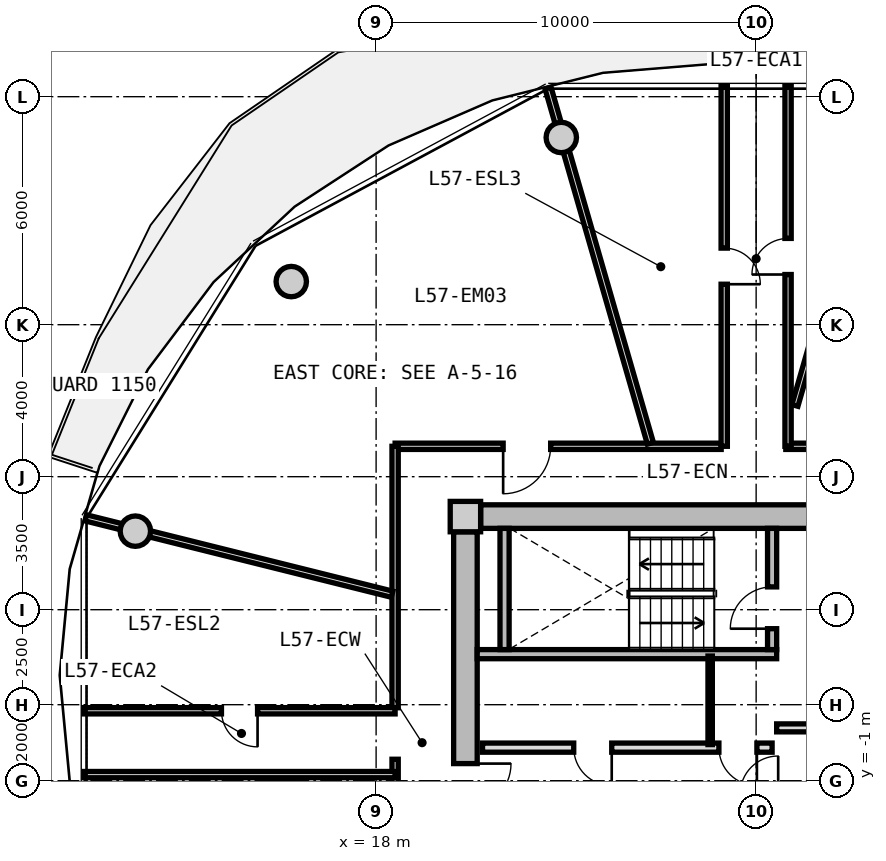
"""IFC4 building model, lengths in metres.
Left out: names, types, materials, properties, quantities, classifications, styles, units other than length and angle.
Written with IfcOpenShell. Run it as: python <this file> out.ifc"""

import sys

from ifc_helpers import new_model, si_unit, direction, frame, frame_2d, origin, origin_2d, place, context, subcontext, project, spatial, rectangle, circle, extrude, source, transform, mapped, element, fill, save


model = new_model("IFC4")
c1 = context("Model", 3, precision=1e-05, world=origin(), true_north=direction((0.0, 1.0)))
c2 = subcontext(c1, "Body", "Model", "MODEL_VIEW")
j1 = project(units=[si_unit("LENGTHUNIT", "METRE"), si_unit("PLANEANGLEUNIT", "RADIAN")], contexts=[c1])
p1 = place(None, origin())
s1 = spatial("IfcSite", under=j1, at=p1, CompositionType="ELEMENT")
p2 = place(p1, origin())
s2 = spatial("IfcBuilding", under=s1, at=p2, CompositionType="ELEMENT")
p3 = place(p2, frame((0.0, 0.0, 183.1)))
s3 = spatial("IfcBuildingStorey", under=s2, at=p3, CompositionType="ELEMENT", Elevation=183.1)
m1 = source(origin(), c2, "Body", "SweptSolid", [
    extrude(rectangle(XDim=0.8, YDim=0.8, at=origin_2d()), origin(), (0.0, 0.0, 1.0), 3.05),
])
p4 = place(p3, frame((20.35, 5.95, 0.0), z_axis=(0.0, 0.0, 1.0), x_axis=(1.0, 0.0, 0.0)))
e1 = element("IfcColumn", 1, at=p4, inside=s3, PredefinedType="COLUMN", context=c2, shape_type="MappedRepresentation", body=[
    mapped(m1, transform((0.0, 0.0, 0.0), x_axis=(1.0, 0.0, 0.0), y_axis=(0.0, 1.0, 0.0), z_axis=(0.0, 0.0, 1.0), scale=1.0)),
])
m2 = source(origin(), c2, "Body", "SweptSolid", [
    extrude(rectangle(XDim=14.5, YDim=0.62, at=frame_2d((7.25, 0.0))), origin(), (0.0, 0.0, 1.0), 2.73),
])
p5 = place(p3, frame((20.75, 5.95, 0.0), z_axis=(0.0, 0.0, 1.0), x_axis=(1.0, 0.0, 0.0)))
e2 = element("IfcWall", 2, at=p5, inside=s3, PredefinedType="SHEAR", context=c2, shape_type="MappedRepresentation", body=[
    mapped(m2, transform((0.0, 0.0, 0.0), x_axis=(1.0, 0.0, 0.0), y_axis=(0.0, 1.0, 0.0), z_axis=(0.0, 0.0, 1.0), scale=1.0)),
])
m3 = source(origin(), c2, "Body", "SweptSolid", [
    extrude(rectangle(XDim=11.1, YDim=0.62, at=frame_2d((5.55, 0.0))), origin(), (0.0, 0.0, 1.0), 2.73),
])
p6 = place(p3, frame((20.35, -5.55, 0.0), z_axis=(0.0, 0.0, 1.0), x_axis=(0.0, 1.0, 0.0)))
e3 = element("IfcWall", 3, at=p6, inside=s3, PredefinedType="SHEAR", context=c2, shape_type="MappedRepresentation", body=[
    mapped(m3, transform((0.0, 0.0, 0.0), x_axis=(1.0, 0.0, 0.0), y_axis=(0.0, 1.0, 0.0), z_axis=(0.0, 0.0, 1.0), scale=1.0)),
])
p7 = place(p6, frame((3.8, 0.0, 0.0)))
e4 = element("IfcOpeningElement", 4, at=p7, cuts=e3, PredefinedType="OPENING", context=c2, shape_type="SweptSolid", body=[
    extrude(rectangle(XDim=1.2, YDim=2.15, at=frame_2d((0.6, 1.075))), frame((0.0, 0.32, 0.0), z_axis=(0.0, -1.0, 0.0), x_axis=(1.0, 0.0, 0.0)), (0.0, 0.0, 1.0), 0.64),
])
m4 = source(origin(), c2, "Body", "SweptSolid", [
    extrude(circle(Radius=0.4, at=origin_2d()), origin(), (0.0, 0.0, 1.0), 3.05),
])
for number, where, z_axis, x_axis in (
    (5, (22.873, 15.926, 0.0), (0.0, 0.0, 1.0), (1.0, 0.0, 0.0)),
    (6, (15.767, 12.135, 0.0), (0.0, 0.0, 1.0), (1.0, 0.0, 0.0)),
    (7, (11.665, 5.567, 0.0), (0.0, 0.0, 1.0), (1.0, 0.0, 0.0)),
):
    element("IfcColumn", number, at=place(p3, frame(where, z_axis=z_axis, x_axis=x_axis)), inside=s3, PredefinedType="COLUMN", context=c2, shape_type="MappedRepresentation", body=[
        mapped(m4, transform((0.0, 0.0, 0.0), x_axis=(1.0, 0.0, 0.0), y_axis=(0.0, 1.0, 0.0), z_axis=(0.0, 0.0, 1.0), scale=1.0)),
    ])
m5 = source(origin(), c2, "Body", "SweptSolid", [
    extrude(rectangle(XDim=7.88, YDim=0.24, at=frame_2d((3.94, 0.0))), origin(), (0.0, 0.0, 1.0), 2.73),
])
p8 = place(p3, frame((20.66, 2.33, 0.0), z_axis=(0.0, 0.0, 1.0), x_axis=(1.0, 0.0, 0.0)))
e8 = element("IfcWall", 8, at=p8, inside=s3, PredefinedType="PARTITIONING", context=c2, shape_type="MappedRepresentation", body=[
    mapped(m5, transform((0.0, 0.0, 0.0), x_axis=(1.0, 0.0, 0.0), y_axis=(0.0, 1.0, 0.0), z_axis=(0.0, 0.0, 1.0), scale=1.0)),
])
m6 = source(origin(), c2, "Body", "SweptSolid", [
    extrude(rectangle(XDim=3.19, YDim=0.24, at=frame_2d((1.595, 0.0))), origin(), (0.0, 0.0, 1.0), 2.73),
])
p9 = place(p3, frame((21.38, 2.45, 0.0), z_axis=(0.0, 0.0, 1.0), x_axis=(0.0, 1.0, 0.0)))
e9 = element("IfcWall", 9, at=p9, inside=s3, PredefinedType="PARTITIONING", context=c2, shape_type="MappedRepresentation", body=[
    mapped(m6, transform((0.0, 0.0, 0.0), x_axis=(1.0, 0.0, 0.0), y_axis=(0.0, 1.0, 0.0), z_axis=(0.0, 0.0, 1.0), scale=1.0)),
])
p10 = place(p3, frame((28.42, 2.45, 0.0), z_axis=(0.0, 0.0, 1.0), x_axis=(0.0, 1.0, 0.0)))
e10 = element("IfcWall", 10, at=p10, inside=s3, PredefinedType="PARTITIONING", context=c2, shape_type="MappedRepresentation", body=[
    mapped(m6, transform((0.0, 0.0, 0.0), x_axis=(1.0, 0.0, 0.0), y_axis=(0.0, 1.0, 0.0), z_axis=(0.0, 0.0, 1.0), scale=1.0)),
])
p11 = place(p10, frame((0.55, 0.0, 0.0)))
e11 = element("IfcOpeningElement", 11, at=p11, cuts=e10, PredefinedType="OPENING", context=c2, shape_type="SweptSolid", body=[
    extrude(rectangle(XDim=1.1, YDim=2.15, at=frame_2d((0.55, 1.075))), frame((0.0, 0.13, 0.0), z_axis=(0.0, -1.0, 0.0), x_axis=(1.0, 0.0, 0.0)), (0.0, 0.0, 1.0), 0.26),
])
m7 = source(origin(), c2, "Body", "SweptSolid", [
    extrude(rectangle(XDim=6.66, YDim=0.21, at=frame_2d((3.33, 0.0))), origin(), (0.0, 0.0, 1.0), 2.715),
])
p12 = place(p3, frame((28.54, 0.39, 0.0), z_axis=(0.0, 0.0, 1.0), x_axis=(1.0, 0.0, 0.0)))
e12 = element("IfcWall", 12, at=p12, inside=s3, PredefinedType="PARTITIONING", context=c2, shape_type="MappedRepresentation", body=[
    mapped(m7, transform((0.0, 0.0, 0.0), x_axis=(1.0, 0.0, 0.0), y_axis=(0.0, 1.0, 0.0), z_axis=(0.0, 0.0, 1.0), scale=1.0)),
])
p13 = place(p12, frame((1.0, 0.0, 0.0)))
e13 = element("IfcOpeningElement", 13, at=p13, cuts=e12, PredefinedType="OPENING", context=c2, shape_type="SweptSolid", body=[
    extrude(rectangle(XDim=1.2, YDim=2.15, at=frame_2d((0.6, 1.075))), frame((0.0, 0.115, 0.0), z_axis=(0.0, -1.0, 0.0), x_axis=(1.0, 0.0, 0.0)), (0.0, 0.0, 1.0), 0.23),
])
m8 = source(origin(), c2, "Body", "SweptSolid", [
    extrude(rectangle(XDim=7.62, YDim=0.24, at=frame_2d((3.81, 0.0))), origin(), (0.0, 0.0, 1.0), 2.715),
])
p14 = place(p3, frame((20.8, -0.13, 0.0), z_axis=(0.0, 0.0, 1.0), x_axis=(1.0, 0.0, 0.0)))
e14 = element("IfcWall", 14, at=p14, inside=s3, PredefinedType="PARTITIONING", context=c2, shape_type="MappedRepresentation", body=[
    mapped(m8, transform((0.0, 0.0, 0.0), x_axis=(1.0, 0.0, 0.0), y_axis=(0.0, 1.0, 0.0), z_axis=(0.0, 0.0, 1.0), scale=1.0)),
])
p15 = place(p14, frame((6.22, 0.0, 0.0)))
e15 = element("IfcOpeningElement", 15, at=p15, cuts=e14, PredefinedType="OPENING", context=c2, shape_type="SweptSolid", body=[
    extrude(rectangle(XDim=1.0, YDim=2.1, at=frame_2d((0.5, 1.05))), frame((0.0, 0.13, 0.0), z_axis=(0.0, -1.0, 0.0), x_axis=(1.0, 0.0, 0.0)), (0.0, 0.0, 1.0), 0.26),
])
p16 = place(p14, frame((2.4, 0.0, 0.0)))
e16 = element("IfcOpeningElement", 16, at=p16, cuts=e14, PredefinedType="OPENING", context=c2, shape_type="SweptSolid", body=[
    extrude(rectangle(XDim=1.0, YDim=2.1, at=frame_2d((0.5, 1.05))), frame((0.0, 0.13, 0.0), z_axis=(0.0, -1.0, 0.0), x_axis=(1.0, 0.0, 0.0)), (0.0, 0.0, 1.0), 0.26),
])
m9 = source(origin(), c2, "Body", "SweptSolid", [
    extrude(rectangle(XDim=2.33, YDim=0.115, at=frame_2d((1.165, 0.0))), origin(), (0.0, 0.0, 1.0), 2.715),
])
p17 = place(p3, frame((26.79, -0.05, 0.0), z_axis=(0.0, 0.0, 1.0), x_axis=(0.0, 1.0, 0.0)))
e17 = element("IfcWall", 17, at=p17, inside=s3, PredefinedType="PARTITIONING", context=c2, shape_type="MappedRepresentation", body=[
    mapped(m9, transform((0.0, 0.0, 0.0), x_axis=(1.0, 0.0, 0.0), y_axis=(0.0, 1.0, 0.0), z_axis=(0.0, 0.0, 1.0), scale=1.0)),
])
m10 = source(origin(), c2, "Body", "SweptSolid", [
    extrude(rectangle(XDim=8.58, YDim=0.165, at=frame_2d((4.29, 0.0))), origin(), (0.0, 0.0, 1.0), 2.715),
])
p18 = place(p3, frame((18.5, 7.8, 0.0), z_axis=(0.0, 0.0, 1.0), x_axis=(1.0, 0.0, 0.0)))
e18 = element("IfcWall", 18, at=p18, inside=s3, PredefinedType="PARTITIONING", context=c2, shape_type="MappedRepresentation", body=[
    mapped(m10, transform((0.0, 0.0, 0.0), x_axis=(1.0, 0.0, 0.0), y_axis=(0.0, 1.0, 0.0), z_axis=(0.0, 0.0, 1.0), scale=1.0)),
])
p19 = place(p18, frame((2.843, 0.0, 0.0)))
e19 = element("IfcOpeningElement", 19, at=p19, cuts=e18, PredefinedType="OPENING", context=c2, shape_type="SweptSolid", body=[
    extrude(rectangle(XDim=1.25, YDim=2.2, at=frame_2d((0.625, 1.1))), frame((0.0, 0.093, 0.0), z_axis=(0.0, -1.0, 0.0), x_axis=(1.0, 0.0, 0.0)), (0.0, 0.0, 1.0), 0.185),
])
m11 = source(origin(), c2, "Body", "SweptSolid", [
    extrude(rectangle(XDim=8.719, YDim=0.165, at=frame_2d((4.36, 0.0))), origin(), (0.0, 0.0, 1.0), 2.715),
])
p20 = place(p3, frame((28.781, 7.8, 0.0), z_axis=(0.0, 0.0, 1.0), x_axis=(1.0, 0.0, 0.0)))
e20 = element("IfcWall", 20, at=p20, inside=s3, PredefinedType="PARTITIONING", context=c2, shape_type="MappedRepresentation", body=[
    mapped(m11, transform((0.0, 0.0, 0.0), x_axis=(1.0, 0.0, 0.0), y_axis=(0.0, 1.0, 0.0), z_axis=(0.0, 0.0, 1.0), scale=1.0)),
])
p21 = place(p20, frame((6.054, 0.0, 0.0)))
e21 = element("IfcOpeningElement", 21, at=p21, cuts=e20, PredefinedType="OPENING", context=c2, shape_type="SweptSolid", body=[
    extrude(rectangle(XDim=1.05, YDim=2.15, at=frame_2d((0.525, 1.075))), frame((0.0, 0.093, 0.0), z_axis=(0.0, -1.0, 0.0), x_axis=(1.0, 0.0, 0.0)), (0.0, 0.0, 1.0), 0.185),
])
p22 = place(p20, frame((3.287, 0.0, 0.0)))
e22 = element("IfcOpeningElement", 22, at=p22, cuts=e20, PredefinedType="OPENING", context=c2, shape_type="SweptSolid", body=[
    extrude(rectangle(XDim=0.92, YDim=2.1, at=frame_2d((0.46, 1.05))), frame((0.0, 0.093, 0.0), z_axis=(0.0, -1.0, 0.0), x_axis=(1.0, 0.0, 0.0)), (0.0, 0.0, 1.0), 0.185),
])
p23 = place(p20, frame((1.0, 0.0, 0.0)))
e23 = element("IfcOpeningElement", 23, at=p23, cuts=e20, PredefinedType="OPENING", context=c2, shape_type="SweptSolid", body=[
    extrude(rectangle(XDim=0.92, YDim=2.1, at=frame_2d((0.46, 1.05))), frame((0.0, 0.093, 0.0), z_axis=(0.0, -1.0, 0.0), x_axis=(1.0, 0.0, 0.0)), (0.0, 0.0, 1.0), 0.185),
])
m12 = source(origin(), c2, "Body", "SweptSolid", [
    extrude(rectangle(XDim=7.365, YDim=0.165, at=frame_2d((3.682, 0.0))), origin(), (0.0, 0.0, 1.0), 2.715),
])
p24 = place(p3, frame((18.5, -7.8, 0.0), z_axis=(0.0, 0.0, 1.0), x_axis=(0.0, 1.0, 0.0)))
e24 = element("IfcWall", 24, at=p24, inside=s3, PredefinedType="PARTITIONING", context=c2, shape_type="MappedRepresentation", body=[
    mapped(m12, transform((0.0, 0.0, 0.0), x_axis=(1.0, 0.0, 0.0), y_axis=(0.0, 1.0, 0.0), z_axis=(0.0, 0.0, 1.0), scale=1.0)),
])
m13 = source(origin(), c2, "Body", "SweptSolid", [
    extrude(rectangle(XDim=6.88, YDim=0.165, at=frame_2d((3.44, 0.0))), origin(), (0.0, 0.0, 1.0), 2.715),
])
p25 = place(p3, frame((18.5, 0.92, 0.0), z_axis=(0.0, 0.0, 1.0), x_axis=(0.0, 1.0, 0.0)))
e25 = element("IfcWall", 25, at=p25, inside=s3, PredefinedType="PARTITIONING", context=c2, shape_type="MappedRepresentation", body=[
    mapped(m13, transform((0.0, 0.0, 0.0), x_axis=(1.0, 0.0, 0.0), y_axis=(0.0, 1.0, 0.0), z_axis=(0.0, 0.0, 1.0), scale=1.0)),
])
m14 = source(origin(), c2, "Body", "SweptSolid", [
    extrude(rectangle(XDim=8.695, YDim=0.165, at=frame_2d((4.348, 0.0))), origin(), (0.0, 0.0, 1.0), 2.265),
])
p26 = place(p3, frame((29.02, 8.875, 0.0), z_axis=(0.0, 0.0, 1.0), x_axis=(0.276797231892, 0.960928349263, 0.0)))
e26 = element("IfcWall", 26, at=p26, inside=s3, PredefinedType="PARTITIONING", context=c2, shape_type="MappedRepresentation", body=[
    mapped(m14, transform((0.0, 0.0, 0.0), x_axis=(1.0, 0.0, 0.0), y_axis=(0.0, 1.0, 0.0), z_axis=(0.0, 0.0, 1.0), scale=1.0)),
])
m15 = source(origin(), c2, "Body", "SweptSolid", [
    extrude(rectangle(XDim=9.73, YDim=0.165, at=frame_2d((4.865, 0.0))), origin(), (0.0, 0.0, 1.0), 2.265),
])
p27 = place(p3, frame((25.217, 7.88, 0.0), z_axis=(0.0, 0.0, 1.0), x_axis=(-0.27679492614, 0.960929013436, 0.0)))
e27 = element("IfcWall", 27, at=p27, inside=s3, PredefinedType="PARTITIONING", context=c2, shape_type="MappedRepresentation", body=[
    mapped(m15, transform((0.0, 0.0, 0.0), x_axis=(1.0, 0.0, 0.0), y_axis=(0.0, 1.0, 0.0), z_axis=(0.0, 0.0, 1.0), scale=1.0)),
])
m16 = source(origin(), c2, "Body", "SweptSolid", [
    extrude(rectangle(XDim=8.305, YDim=0.165, at=frame_2d((4.153, 0.0))), origin(), (0.0, 0.0, 1.0), 2.265),
])
p28 = place(p3, frame((18.42, 3.908, 0.0), z_axis=(0.0, 0.0, 1.0), x_axis=(-0.970309994378, 0.241864662175, 0.0)))
e28 = element("IfcWall", 28, at=p28, inside=s3, PredefinedType="PARTITIONING", context=c2, shape_type="MappedRepresentation", body=[
    mapped(m16, transform((0.0, 0.0, 0.0), x_axis=(1.0, 0.0, 0.0), y_axis=(0.0, 1.0, 0.0), z_axis=(0.0, 0.0, 1.0), scale=1.0)),
])
m17 = source(origin(), c2, "Body", "SweptSolid", [
    extrude(rectangle(XDim=5.564, YDim=0.165, at=frame_2d((2.782, 0.0))), origin(), (0.0, 0.0, 1.0), 2.265),
])
p29 = place(p3, frame((15.76, -1.02, 0.0), z_axis=(0.0, 0.0, 1.0), x_axis=(-0.970315176167, -0.241843872984, 0.0)))
e29 = element("IfcWall", 29, at=p29, inside=s3, PredefinedType="PARTITIONING", context=c2, shape_type="MappedRepresentation", body=[
    mapped(m17, transform((0.0, 0.0, 0.0), x_axis=(1.0, 0.0, 0.0), y_axis=(0.0, 1.0, 0.0), z_axis=(0.0, 0.0, 1.0), scale=1.0)),
])
m18 = source(origin(), c2, "Body", "SweptSolid", [
    extrude(rectangle(XDim=9.48, YDim=0.165, at=frame_2d((4.74, 0.0))), origin(), (0.0, 0.0, 1.0), 2.715),
])
p30 = place(p3, frame((27.16, 7.8, 0.0), z_axis=(0.0, 0.0, 1.0), x_axis=(0.0, 1.0, 0.0)))
e30 = element("IfcWall", 30, at=p30, inside=s3, PredefinedType="PARTITIONING", context=c2, shape_type="MappedRepresentation", body=[
    mapped(m18, transform((0.0, 0.0, 0.0), x_axis=(1.0, 0.0, 0.0), y_axis=(0.0, 1.0, 0.0), z_axis=(0.0, 0.0, 1.0), scale=1.0)),
])
p31 = place(p30, frame((4.265, 0.0, 0.0)))
e31 = element("IfcOpeningElement", 31, at=p31, cuts=e30, PredefinedType="OPENING", context=c2, shape_type="SweptSolid", body=[
    extrude(rectangle(XDim=0.95, YDim=2.1, at=frame_2d((0.475, 1.05))), frame((0.0, 0.093, 0.0), z_axis=(0.0, -1.0, 0.0), x_axis=(1.0, 0.0, 0.0)), (0.0, 0.0, 1.0), 0.185),
])
p32 = place(p3, frame((28.84, 17.28, 0.0), z_axis=(0.0, 0.0, 1.0), x_axis=(0.0, -1.0, 0.0)))
e32 = element("IfcWall", 32, at=p32, inside=s3, PredefinedType="PARTITIONING", context=c2, shape_type="MappedRepresentation", body=[
    mapped(m18, transform((0.0, 0.0, 0.0), x_axis=(1.0, 0.0, 0.0), y_axis=(0.0, 1.0, 0.0), z_axis=(0.0, 0.0, 1.0), scale=1.0)),
])
p33 = place(p32, frame((4.01, 0.0, 0.0)))
e33 = element("IfcOpeningElement", 33, at=p33, cuts=e32, PredefinedType="OPENING", context=c2, shape_type="SweptSolid", body=[
    extrude(rectangle(XDim=0.95, YDim=2.1, at=frame_2d((0.475, 1.05))), frame((0.0, 0.093, 0.0), z_axis=(0.0, -1.0, 0.0), x_axis=(1.0, 0.0, 0.0)), (0.0, 0.0, 1.0), 0.185),
])
m19 = source(origin(), c2, "Body", "SweptSolid", [
    extrude(rectangle(XDim=8.189, YDim=0.165, at=frame_2d((4.094, 0.0))), origin(), (0.0, 0.0, 1.0), 2.715),
])
p34 = place(p3, frame((10.311, 0.84, 0.0), z_axis=(0.0, 0.0, 1.0), x_axis=(1.0, 0.0, 0.0)))
e34 = element("IfcWall", 34, at=p34, inside=s3, PredefinedType="PARTITIONING", context=c2, shape_type="MappedRepresentation", body=[
    mapped(m19, transform((0.0, 0.0, 0.0), x_axis=(1.0, 0.0, 0.0), y_axis=(0.0, 1.0, 0.0), z_axis=(0.0, 0.0, 1.0), scale=1.0)),
])
p35 = place(p34, frame((3.619, 0.0, 0.0)))
e35 = element("IfcOpeningElement", 35, at=p35, cuts=e34, PredefinedType="OPENING", context=c2, shape_type="SweptSolid", body=[
    extrude(rectangle(XDim=0.95, YDim=2.1, at=frame_2d((0.475, 1.05))), frame((0.0, 0.093, 0.0), z_axis=(0.0, -1.0, 0.0), x_axis=(1.0, 0.0, 0.0)), (0.0, 0.0, 1.0), 0.185),
])
p36 = place(p3, frame((18.5, -0.84, 0.0), z_axis=(0.0, 0.0, 1.0), x_axis=(-1.0, 0.0, 0.0)))
e36 = element("IfcWall", 36, at=p36, inside=s3, PredefinedType="PARTITIONING", context=c2, shape_type="MappedRepresentation", body=[
    mapped(m19, transform((0.0, 0.0, 0.0), x_axis=(1.0, 0.0, 0.0), y_axis=(0.0, 1.0, 0.0), z_axis=(0.0, 0.0, 1.0), scale=1.0)),
])
m20 = source(origin(), c2, "Body", "SweptSolid", [
    extrude(rectangle(XDim=1.1, YDim=2.15, at=frame_2d((0.55, 1.075))), frame((0.0, 0.025, 0.0), z_axis=(0.0, -1.0, 0.0), x_axis=(1.0, 0.0, 0.0)), (0.0, 0.0, 1.0), 0.05),
])
p37 = place(p11, origin())
e37 = element("IfcDoor", 37, at=p37, inside=s3, OperationType="SINGLE_SWING_LEFT", PredefinedType="DOOR", context=c2, shape_type="MappedRepresentation", body=[
    mapped(m20, transform((0.0, 0.0, 0.0), x_axis=(1.0, 0.0, 0.0), y_axis=(0.0, 1.0, 0.0), z_axis=(0.0, 0.0, 1.0), scale=1.0)),
])
fill(e11, e37)
m21 = source(origin(), c2, "Body", "SweptSolid", [
    extrude(rectangle(XDim=1.2, YDim=2.15, at=frame_2d((0.6, 1.075))), frame((0.0, 0.025, 0.0), z_axis=(0.0, -1.0, 0.0), x_axis=(1.0, 0.0, 0.0)), (0.0, 0.0, 1.0), 0.05),
])
p38 = place(p7, frame((1.2, 0.0, 0.0), z_axis=(0.0, 0.0, 1.0), x_axis=(-1.0, 0.0, 0.0)))
e38 = element("IfcDoor", 38, at=p38, inside=s3, OperationType="SINGLE_SWING_LEFT", PredefinedType="DOOR", context=c2, shape_type="MappedRepresentation", body=[
    mapped(m21, transform((0.0, 0.0, 0.0), x_axis=(1.0, 0.0, 0.0), y_axis=(0.0, 1.0, 0.0), z_axis=(0.0, 0.0, 1.0), scale=1.0)),
])
fill(e4, e38)
m22 = source(origin(), c2, "Body", "SweptSolid", [
    extrude(rectangle(XDim=1.0, YDim=2.1, at=frame_2d((0.5, 1.05))), frame((0.0, 0.025, 0.0), z_axis=(0.0, -1.0, 0.0), x_axis=(1.0, 0.0, 0.0)), (0.0, 0.0, 1.0), 0.05),
])
p39 = place(p15, frame((1.0, 0.0, 0.0), z_axis=(0.0, 0.0, 1.0), x_axis=(-1.0, 0.0, 0.0)))
e39 = element("IfcDoor", 39, at=p39, inside=s3, OperationType="SINGLE_SWING_LEFT", PredefinedType="DOOR", context=c2, shape_type="MappedRepresentation", body=[
    mapped(m22, transform((0.0, 0.0, 0.0), x_axis=(1.0, 0.0, 0.0), y_axis=(0.0, 1.0, 0.0), z_axis=(0.0, 0.0, 1.0), scale=1.0)),
])
fill(e15, e39)
p40 = place(p16, frame((1.0, 0.0, 0.0), z_axis=(0.0, 0.0, 1.0), x_axis=(-1.0, 0.0, 0.0)))
e40 = element("IfcDoor", 40, at=p40, inside=s3, OperationType="SINGLE_SWING_LEFT", PredefinedType="DOOR", context=c2, shape_type="MappedRepresentation", body=[
    mapped(m22, transform((0.0, 0.0, 0.0), x_axis=(1.0, 0.0, 0.0), y_axis=(0.0, 1.0, 0.0), z_axis=(0.0, 0.0, 1.0), scale=1.0)),
])
fill(e16, e40)
m23 = source(origin(), c2, "Body", "SweptSolid", [
    extrude(rectangle(XDim=0.95, YDim=2.1, at=frame_2d((0.475, 1.05))), frame((0.0, 0.025, 0.0), z_axis=(0.0, -1.0, 0.0), x_axis=(1.0, 0.0, 0.0)), (0.0, 0.0, 1.0), 0.05),
])
p41 = place(p35, frame((0.95, 0.0, 0.0), z_axis=(0.0, 0.0, 1.0), x_axis=(-1.0, 0.0, 0.0)))
e41 = element("IfcDoor", 41, at=p41, inside=s3, OperationType="SINGLE_SWING_LEFT", PredefinedType="DOOR", context=c2, shape_type="MappedRepresentation", body=[
    mapped(m23, transform((0.0, 0.0, 0.0), x_axis=(1.0, 0.0, 0.0), y_axis=(0.0, 1.0, 0.0), z_axis=(0.0, 0.0, 1.0), scale=1.0)),
])
fill(e35, e41)
p42 = place(p31, frame((0.95, 0.0, 0.0), z_axis=(0.0, 0.0, 1.0), x_axis=(-1.0, 0.0, 0.0)))
e42 = element("IfcDoor", 42, at=p42, inside=s3, OperationType="SINGLE_SWING_RIGHT", PredefinedType="DOOR", context=c2, shape_type="MappedRepresentation", body=[
    mapped(m23, transform((0.0, 0.0, 0.0), x_axis=(1.0, 0.0, 0.0), y_axis=(0.0, 1.0, 0.0), z_axis=(0.0, 0.0, 1.0), scale=1.0)),
])
fill(e31, e42)
p43 = place(p33, frame((0.95, 0.0, 0.0), z_axis=(0.0, 0.0, 1.0), x_axis=(-1.0, 0.0, 0.0)))
e43 = element("IfcDoor", 43, at=p43, inside=s3, OperationType="SINGLE_SWING_LEFT", PredefinedType="DOOR", context=c2, shape_type="MappedRepresentation", body=[
    mapped(m23, transform((0.0, 0.0, 0.0), x_axis=(1.0, 0.0, 0.0), y_axis=(0.0, 1.0, 0.0), z_axis=(0.0, 0.0, 1.0), scale=1.0)),
])
fill(e33, e43)
m24 = source(origin(), c2, "Body", "SweptSolid", [
    extrude(rectangle(XDim=1.25, YDim=2.2, at=frame_2d((0.625, 1.1))), frame((0.0, 0.025, 0.0), z_axis=(0.0, -1.0, 0.0), x_axis=(1.0, 0.0, 0.0)), (0.0, 0.0, 1.0), 0.05),
])
p44 = place(p19, frame((1.25, 0.0, 0.0), z_axis=(0.0, 0.0, 1.0), x_axis=(-1.0, 0.0, 0.0)))
e44 = element("IfcDoor", 44, at=p44, inside=s3, OperationType="SINGLE_SWING_RIGHT", PredefinedType="DOOR", context=c2, shape_type="MappedRepresentation", body=[
    mapped(m24, transform((0.0, 0.0, 0.0), x_axis=(1.0, 0.0, 0.0), y_axis=(0.0, 1.0, 0.0), z_axis=(0.0, 0.0, 1.0), scale=1.0)),
])
fill(e19, e44)
save(model, sys.argv[1])
